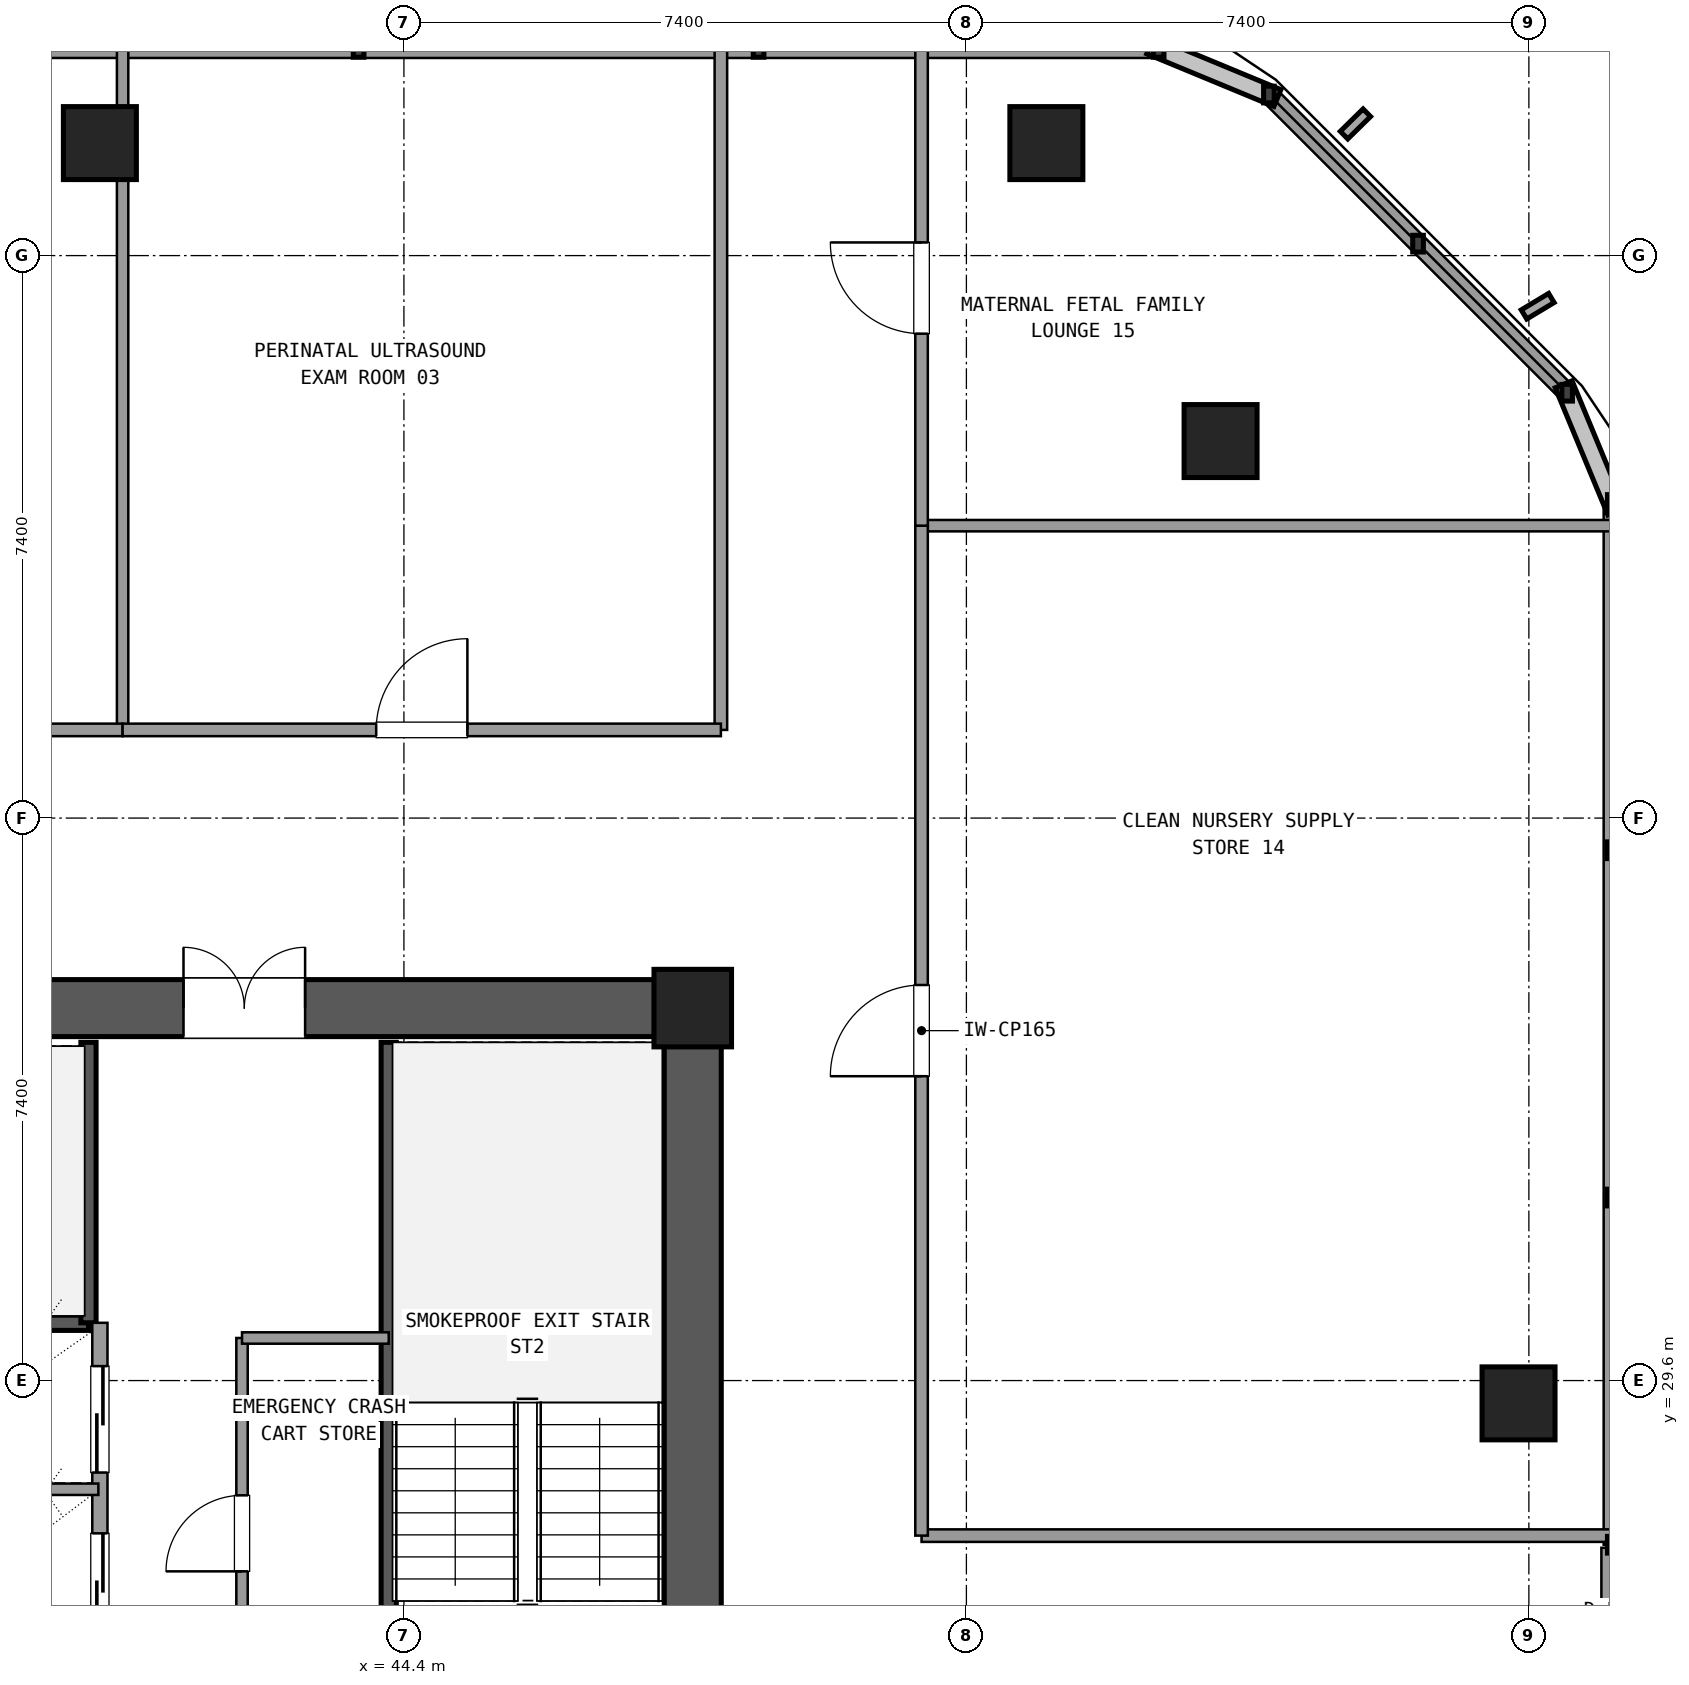
"""IFC4 building model, lengths in metres.
Left out: names, types, materials, properties, quantities, classifications, styles, units other than length and angle.
Written with IfcOpenShell. Run it as: python <this file> out.ifc"""

import sys

from ifc_helpers import new_model, si_unit, direction, frame, frame_2d, origin, origin_2d, place, context, subcontext, project, spatial, rectangle, extrude, element, fill, save


model = new_model("IFC4")
c1 = context("Model", 3, precision=1e-05, world=origin(), true_north=direction((0.0, 1.0)))
c2 = subcontext(c1, "Body", "Model", "MODEL_VIEW")
j1 = project(units=[si_unit("LENGTHUNIT", "METRE"), si_unit("PLANEANGLEUNIT", "RADIAN")], contexts=[c1])
p1 = place(None, origin())
s1 = spatial("IfcSite", under=j1, at=p1, CompositionType="ELEMENT")
p2 = place(p1, origin())
s2 = spatial("IfcBuilding", under=s1, at=p2, CompositionType="ELEMENT")
p3 = place(p2, frame((0.0, 0.0, 160.02)))
s3 = spatial("IfcBuildingStorey", under=s2, at=p3, CompositionType="ELEMENT", Elevation=160.02)
p4 = place(p3, frame((48.2, 34.5, 0.0), z_axis=(0.0, 0.0, 1.0), x_axis=(1.0, 0.0, 0.0)))
e1 = element("IfcColumn", 1, at=p4, inside=s3, PredefinedType="COLUMN", context=c2, shape_type="SweptSolid", body=[
    extrude(rectangle(XDim=1.02, YDim=1.02, at=origin_2d()), origin(), (0.0, 0.0, 1.0), 3.6),
])
p5 = place(p3, frame((48.2, 26.405, 0.0), z_axis=(0.0, 0.0, 1.0), x_axis=(0.0, 1.0, 0.0)))
e2 = element("IfcWall", 2, at=p5, inside=s3, PredefinedType="SHEAR", context=c2, shape_type="SweptSolid", body=[
    extrude(rectangle(XDim=7.59, YDim=0.75, at=frame_2d((3.795, 0.0))), origin(), (0.0, 0.0, 1.0), 3.32),
])
p6 = place(p3, frame((47.695, 34.5, 0.0), z_axis=(0.0, 0.0, 1.0), x_axis=(-1.0, 0.0, 0.0)))
e3 = element("IfcWall", 3, at=p6, inside=s3, PredefinedType="SHEAR", context=c2, shape_type="SweptSolid", body=[
    extrude(rectangle(XDim=10.19, YDim=0.75, at=frame_2d((5.095, 0.0))), origin(), (0.0, 0.0, 1.0), 3.32),
])
p7 = place(p6, frame((4.595, 0.0, 0.0)))
e4 = element("IfcOpeningElement", 4, at=p7, cuts=e3, PredefinedType="OPENING", context=c2, shape_type="SweptSolid", body=[
    extrude(rectangle(XDim=1.6, YDim=2.2, at=frame_2d((0.8, 1.1))), frame((0.0, 0.385, 0.0), z_axis=(0.0, -1.0, 0.0), x_axis=(1.0, 0.0, 0.0)), (0.0, 0.0, 1.0), 0.77),
])
for number, where, z_axis, x_axis in (
    (5, (59.064, 29.3, 0.0), (0.0, 0.0, 1.0), (1.0, 0.0, 0.0)),
    (6, (55.144, 41.96, 0.0), (0.0, 0.0, 1.0), (1.0, 0.0, 0.0)),
    (7, (52.852, 45.88, 0.0), (0.0, 0.0, 1.0), (1.0, 0.0, 0.0)),
    (8, (40.4, 45.88, 0.0), (0.0, 0.0, 1.0), (1.0, 0.0, 0.0)),
):
    element("IfcColumn", number, at=place(p3, frame(where, z_axis=z_axis, x_axis=x_axis)), inside=s3, PredefinedType="COLUMN", context=c2, shape_type="SweptSolid", body=[
        extrude(rectangle(XDim=0.96, YDim=0.96, at=origin_2d()), origin(), (0.0, 0.0, 1.0), 3.6),
    ])
p8 = place(p3, frame((60.304, 24.4, 0.0), z_axis=(0.0, 0.0, 1.0), x_axis=(0.0, 1.0, 0.0)))
e9 = element("IfcWall", 9, at=p8, inside=s3, PredefinedType="SOLIDWALL", context=c2, shape_type="SweptSolid", body=[
    extrude(rectangle(XDim=3.0, YDim=0.3, at=frame_2d((1.5, 0.0))), origin(), (0.0, 0.0, 1.0), 2.67),
])
p9 = place(p8, frame((0.9, 0.0, 0.0)))
e10 = element("IfcOpeningElement", 10, at=p9, cuts=e9, PredefinedType="OPENING", context=c2, shape_type="SweptSolid", body=[
    extrude(rectangle(XDim=1.2, YDim=2.2, at=frame_2d((0.6, 1.1))), frame((0.0, 0.16, 0.0), z_axis=(0.0, -1.0, 0.0), x_axis=(1.0, 0.0, 0.0)), (0.0, 0.0, 1.0), 0.32),
])
p10 = place(p3, frame((60.304, 27.44, 0.0), z_axis=(0.0, 0.0, 1.0), x_axis=(0.0, 1.0, 0.0)))
e11 = element("IfcWall", 11, at=p10, inside=s3, PredefinedType="SOLIDWALL", context=c2, shape_type="SweptSolid", body=[
    extrude(rectangle(XDim=13.705, YDim=0.24, at=frame_2d((6.853, 0.0))), origin(), (0.0, 0.0, 1.0), 0.85),
])
p11 = place(p3, frame((59.703, 42.596, 0.0), z_axis=(0.0, 0.0, 1.0), x_axis=(-0.707084777957, 0.707128783731, 0.0)))
e12 = element("IfcWall", 12, at=p11, inside=s3, PredefinedType="SOLIDWALL", context=c2, shape_type="SweptSolid", body=[
    extrude(rectangle(XDim=5.548, YDim=0.24, at=frame_2d((2.774, 0.0))), origin(), (0.0, 0.0, 1.0), 0.85),
])
p12 = place(p3, frame((54.329, 47.12, 0.0), z_axis=(0.0, 0.0, 1.0), x_axis=(-1.0, 0.0, 0.0)))
e13 = element("IfcWall", 13, at=p12, inside=s3, PredefinedType="SOLIDWALL", context=c2, shape_type="SweptSolid", body=[
    extrude(rectangle(XDim=15.788, YDim=0.24, at=frame_2d((7.894, 0.0))), origin(), (0.0, 0.0, 1.0), 0.85),
])
p13 = place(p3, frame((44.2, 24.65, 0.0), z_axis=(0.0, 0.0, 1.0), x_axis=(0.0, 1.0, 0.0)))
e14 = element("IfcWall", 14, at=p13, inside=s3, PredefinedType="SHEAR", context=c2, shape_type="SweptSolid", body=[
    extrude(rectangle(XDim=9.4, YDim=0.2, at=frame_2d((4.7, 0.0))), origin(), (0.0, 0.0, 1.0), 3.32),
])
p14 = place(p3, frame((30.75, 30.36, 0.0), z_axis=(0.0, 0.0, 1.0), x_axis=(1.0, 0.0, 0.0)))
e15 = element("IfcWall", 15, at=p14, inside=s3, PredefinedType="SHEAR", context=c2, shape_type="SweptSolid", body=[
    extrude(rectangle(XDim=9.5, YDim=0.2, at=frame_2d((4.75, 0.0))), origin(), (0.0, 0.0, 1.0), 3.32),
])
p15 = place(p3, frame((40.25, 30.36, 0.0), z_axis=(0.0, 0.0, 1.0), x_axis=(0.0, 1.0, 0.0)))
e16 = element("IfcWall", 16, at=p15, inside=s3, PredefinedType="SHEAR", context=c2, shape_type="SweptSolid", body=[
    extrude(rectangle(XDim=3.69, YDim=0.2, at=frame_2d((1.845, 0.0))), origin(), (0.0, 0.0, 1.0), 3.32),
])
p16 = place(p3, frame((40.4, 23.54, 0.0), z_axis=(0.0, 0.0, 1.0), x_axis=(0.0, 1.0, 0.0)))
e17 = element("IfcWall", 17, at=p16, inside=s3, PredefinedType="SOLIDWALL", context=c2, shape_type="SweptSolid", body=[
    extrude(rectangle(XDim=6.82, YDim=0.2, at=frame_2d((3.41, 0.0))), origin(), (0.0, 0.0, 1.0), 2.61),
])
p17 = place(p16, frame((0.35, 0.0, 0.0)))
e18 = element("IfcOpeningElement", 18, at=p17, cuts=e17, PredefinedType="OPENING", context=c2, shape_type="SweptSolid", body=[
    extrude(rectangle(XDim=1.4, YDim=2.2, at=frame_2d((0.7, 1.1))), frame((0.0, 0.11, 0.0), z_axis=(0.0, -1.0, 0.0), x_axis=(1.0, 0.0, 0.0)), (0.0, 0.0, 1.0), 0.22),
])
p18 = place(p16, frame((2.65, 0.0, 0.0)))
e19 = element("IfcOpeningElement", 19, at=p18, cuts=e17, PredefinedType="OPENING", context=c2, shape_type="SweptSolid", body=[
    extrude(rectangle(XDim=1.4, YDim=2.2, at=frame_2d((0.7, 1.1))), frame((0.0, 0.11, 0.0), z_axis=(0.0, -1.0, 0.0), x_axis=(1.0, 0.0, 0.0)), (0.0, 0.0, 1.0), 0.22),
])
p19 = place(p16, frame((4.85, 0.0, 0.0)))
e20 = element("IfcOpeningElement", 20, at=p19, cuts=e17, PredefinedType="OPENING", context=c2, shape_type="SweptSolid", body=[
    extrude(rectangle(XDim=1.4, YDim=2.2, at=frame_2d((0.7, 1.1))), frame((0.0, 0.11, 0.0), z_axis=(0.0, -1.0, 0.0), x_axis=(1.0, 0.0, 0.0)), (0.0, 0.0, 1.0), 0.22),
])
p20 = place(p3, frame((37.37, 28.17, 0.0), z_axis=(0.0, 0.0, 1.0), x_axis=(1.0, 0.0, 0.0)))
e21 = element("IfcWall", 21, at=p20, inside=s3, PredefinedType="PARTITIONING", context=c2, shape_type="SweptSolid", body=[
    extrude(rectangle(XDim=3.01, YDim=0.15, at=frame_2d((1.505, 0.0))), origin(), (0.0, 0.0, 1.0), 2.61),
])
p21 = place(p3, frame((42.27, 26.54, 0.0), z_axis=(0.0, 0.0, 1.0), x_axis=(0.0, 1.0, 0.0)))
e22 = element("IfcWall", 22, at=p21, inside=s3, PredefinedType="PARTITIONING", context=c2, shape_type="SweptSolid", body=[
    extrude(rectangle(XDim=3.62, YDim=0.15, at=frame_2d((1.81, 0.0))), origin(), (0.0, 0.0, 1.0), 2.61),
])
p22 = place(p21, frame((0.55, 0.0, 0.0)))
e23 = element("IfcOpeningElement", 23, at=p22, cuts=e22, PredefinedType="OPENING", context=c2, shape_type="SweptSolid", body=[
    extrude(rectangle(XDim=1.0, YDim=2.15, at=frame_2d((0.5, 1.075))), frame((0.0, 0.085, 0.0), z_axis=(0.0, -1.0, 0.0), x_axis=(1.0, 0.0, 0.0)), (0.0, 0.0, 1.0), 0.17),
])
p23 = place(p3, frame((42.27, 30.16, 0.0), z_axis=(0.0, 0.0, 1.0), x_axis=(1.0, 0.0, 0.0)))
e24 = element("IfcWall", 24, at=p23, inside=s3, PredefinedType="PARTITIONING", context=c2, shape_type="SweptSolid", body=[
    extrude(rectangle(XDim=1.93, YDim=0.15, at=frame_2d((0.965, 0.0))), origin(), (0.0, 0.0, 1.0), 2.61),
])
p24 = place(p3, frame((48.57, 38.16, 0.0), z_axis=(0.0, 0.0, 1.0), x_axis=(0.0, 1.0, 0.0)))
e25 = element("IfcWall", 25, at=p24, inside=s3, PredefinedType="PARTITIONING", context=c2, shape_type="SweptSolid", body=[
    extrude(rectangle(XDim=8.94, YDim=0.165, at=frame_2d((4.47, 0.0))), origin(), (0.0, 0.0, 1.0), 2.61),
])
p25 = place(p3, frame((51.21, 27.56, 0.0), z_axis=(0.0, 0.0, 1.0), x_axis=(1.0, 0.0, 0.0)))
e26 = element("IfcWall", 26, at=p25, inside=s3, PredefinedType="PARTITIONING", context=c2, shape_type="SweptSolid", body=[
    extrude(rectangle(XDim=9.074, YDim=0.165, at=frame_2d((4.537, 0.0))), origin(), (0.0, 0.0, 1.0), 2.61),
])
p26 = place(p3, frame((40.699, 38.16, 0.0), z_axis=(0.0, 0.0, 1.0), x_axis=(0.0, 1.0, 0.0)))
e27 = element("IfcWall", 27, at=p26, inside=s3, PredefinedType="PARTITIONING", context=c2, shape_type="SweptSolid", body=[
    extrude(rectangle(XDim=8.94, YDim=0.15, at=frame_2d((4.47, 0.0))), origin(), (0.0, 0.0, 1.0), 2.61),
])
p27 = place(p3, frame((33.07, 38.16, 0.0), z_axis=(0.0, 0.0, 1.0), x_axis=(1.0, 0.0, 0.0)))
e28 = element("IfcWall", 28, at=p27, inside=s3, PredefinedType="PARTITIONING", context=c2, shape_type="SweptSolid", body=[
    extrude(rectangle(XDim=7.629, YDim=0.165, at=frame_2d((3.814, 0.0))), origin(), (0.0, 0.0, 1.0), 2.61),
])
p28 = place(p27, frame((2.431, 0.0, 0.0)))
e29 = element("IfcOpeningElement", 29, at=p28, cuts=e28, PredefinedType="OPENING", context=c2, shape_type="SweptSolid", body=[
    extrude(rectangle(XDim=1.2, YDim=2.15, at=frame_2d((0.6, 1.075))), frame((0.0, 0.093, 0.0), z_axis=(0.0, -1.0, 0.0), x_axis=(1.0, 0.0, 0.0)), (0.0, 0.0, 1.0), 0.185),
])
p29 = place(p3, frame((40.699, 38.16, 0.0), z_axis=(0.0, 0.0, 1.0), x_axis=(1.0, 0.0, 0.0)))
e30 = element("IfcWall", 30, at=p29, inside=s3, PredefinedType="PARTITIONING", context=c2, shape_type="SweptSolid", body=[
    extrude(rectangle(XDim=7.871, YDim=0.165, at=frame_2d((3.936, 0.0))), origin(), (0.0, 0.0, 1.0), 2.61),
])
p30 = place(p29, frame((3.336, 0.0, 0.0)))
e31 = element("IfcOpeningElement", 31, at=p30, cuts=e30, PredefinedType="OPENING", context=c2, shape_type="SweptSolid", body=[
    extrude(rectangle(XDim=1.2, YDim=2.15, at=frame_2d((0.6, 1.075))), frame((0.0, 0.093, 0.0), z_axis=(0.0, -1.0, 0.0), x_axis=(1.0, 0.0, 0.0)), (0.0, 0.0, 1.0), 0.185),
])
p31 = place(p3, frame((51.21, 40.847, 0.0), z_axis=(0.0, 0.0, 1.0), x_axis=(1.0, 0.0, 0.0)))
e32 = element("IfcWall", 32, at=p31, inside=s3, PredefinedType="PARTITIONING", context=c2, shape_type="SweptSolid", body=[
    extrude(rectangle(XDim=9.074, YDim=0.15, at=frame_2d((4.537, 0.0))), origin(), (0.0, 0.0, 1.0), 2.61),
])
p32 = place(p3, frame((51.21, 27.56, 0.0), z_axis=(0.0, 0.0, 1.0), x_axis=(0.0, 1.0, 0.0)))
e33 = element("IfcWall", 33, at=p32, inside=s3, PredefinedType="PARTITIONING", context=c2, shape_type="SweptSolid", body=[
    extrude(rectangle(XDim=13.287, YDim=0.165, at=frame_2d((6.644, 0.0))), origin(), (0.0, 0.0, 1.0), 2.61),
])
p33 = place(p32, frame((6.044, 0.0, 0.0)))
e34 = element("IfcOpeningElement", 34, at=p33, cuts=e33, PredefinedType="OPENING", context=c2, shape_type="SweptSolid", body=[
    extrude(rectangle(XDim=1.2, YDim=2.15, at=frame_2d((0.6, 1.075))), frame((0.0, 0.093, 0.0), z_axis=(0.0, -1.0, 0.0), x_axis=(1.0, 0.0, 0.0)), (0.0, 0.0, 1.0), 0.185),
])
p34 = place(p3, frame((51.21, 40.847, 0.0), z_axis=(0.0, 0.0, 1.0), x_axis=(0.0, 1.0, 0.0)))
e35 = element("IfcWall", 35, at=p34, inside=s3, PredefinedType="PARTITIONING", context=c2, shape_type="SweptSolid", body=[
    extrude(rectangle(XDim=6.253, YDim=0.165, at=frame_2d((3.126, 0.0))), origin(), (0.0, 0.0, 1.0), 2.61),
])
p35 = place(p34, frame((2.526, 0.0, 0.0)))
e36 = element("IfcOpeningElement", 36, at=p35, cuts=e35, PredefinedType="OPENING", context=c2, shape_type="SweptSolid", body=[
    extrude(rectangle(XDim=1.2, YDim=2.15, at=frame_2d((0.6, 1.075))), frame((0.0, 0.093, 0.0), z_axis=(0.0, -1.0, 0.0), x_axis=(1.0, 0.0, 0.0)), (0.0, 0.0, 1.0), 0.185),
])
p36 = place(p7, frame((1.6, 0.0, 0.0), z_axis=(0.0, 0.0, 1.0), x_axis=(-1.0, 0.0, 0.0)))
e37 = element("IfcDoor", 37, at=p36, inside=s3, OperationType="DOUBLE_DOOR_SINGLE_SWING", PredefinedType="DOOR", context=c2, shape_type="SweptSolid", body=[
    extrude(rectangle(XDim=1.6, YDim=2.2, at=frame_2d((0.8, 1.1))), frame((0.0, 0.025, 0.0), z_axis=(0.0, -1.0, 0.0), x_axis=(1.0, 0.0, 0.0)), (0.0, 0.0, 1.0), 0.05),
])
fill(e4, e37)
p37 = place(p18, origin())
e38 = element("IfcDoor", 38, at=p37, inside=s3, OperationType="SLIDING_TO_LEFT", PredefinedType="DOOR", context=c2, shape_type="SweptSolid", body=[
    extrude(rectangle(XDim=1.4, YDim=2.2, at=frame_2d((0.7, 1.1))), frame((0.0, 0.025, 0.0), z_axis=(0.0, -1.0, 0.0), x_axis=(1.0, 0.0, 0.0)), (0.0, 0.0, 1.0), 0.05),
])
fill(e19, e38)
p38 = place(p19, origin())
e39 = element("IfcDoor", 39, at=p38, inside=s3, OperationType="SLIDING_TO_RIGHT", PredefinedType="DOOR", context=c2, shape_type="SweptSolid", body=[
    extrude(rectangle(XDim=1.4, YDim=2.2, at=frame_2d((0.7, 1.1))), frame((0.0, 0.025, 0.0), z_axis=(0.0, -1.0, 0.0), x_axis=(1.0, 0.0, 0.0)), (0.0, 0.0, 1.0), 0.05),
])
fill(e20, e39)
p39 = place(p22, origin())
e40 = element("IfcDoor", 40, at=p39, inside=s3, OperationType="SINGLE_SWING_LEFT", PredefinedType="DOOR", context=c2, shape_type="SweptSolid", body=[
    extrude(rectangle(XDim=1.0, YDim=2.15, at=frame_2d((0.5, 1.075))), frame((0.0, 0.025, 0.0), z_axis=(0.0, -1.0, 0.0), x_axis=(1.0, 0.0, 0.0)), (0.0, 0.0, 1.0), 0.05),
])
fill(e23, e40)
p40 = place(p30, origin())
e41 = element("IfcDoor", 41, at=p40, inside=s3, OperationType="SINGLE_SWING_RIGHT", PredefinedType="DOOR", context=c2, shape_type="SweptSolid", body=[
    extrude(rectangle(XDim=1.2, YDim=2.15, at=frame_2d((0.6, 1.075))), frame((0.0, 0.025, 0.0), z_axis=(0.0, -1.0, 0.0), x_axis=(1.0, 0.0, 0.0)), (0.0, 0.0, 1.0), 0.05),
])
fill(e31, e41)
p41 = place(p33, origin())
e42 = element("IfcDoor", 42, at=p41, inside=s3, OperationType="SINGLE_SWING_LEFT", PredefinedType="DOOR", context=c2, shape_type="SweptSolid", body=[
    extrude(rectangle(XDim=1.2, YDim=2.15, at=frame_2d((0.6, 1.075))), frame((0.0, 0.025, 0.0), z_axis=(0.0, -1.0, 0.0), x_axis=(1.0, 0.0, 0.0)), (0.0, 0.0, 1.0), 0.05),
])
fill(e34, e42)
p42 = place(p35, origin())
e43 = element("IfcDoor", 43, at=p42, inside=s3, OperationType="SINGLE_SWING_RIGHT", PredefinedType="DOOR", context=c2, shape_type="SweptSolid", body=[
    extrude(rectangle(XDim=1.2, YDim=2.15, at=frame_2d((0.6, 1.075))), frame((0.0, 0.025, 0.0), z_axis=(0.0, -1.0, 0.0), x_axis=(1.0, 0.0, 0.0)), (0.0, 0.0, 1.0), 0.05),
])
fill(e36, e43)
save(model, sys.argv[1])
